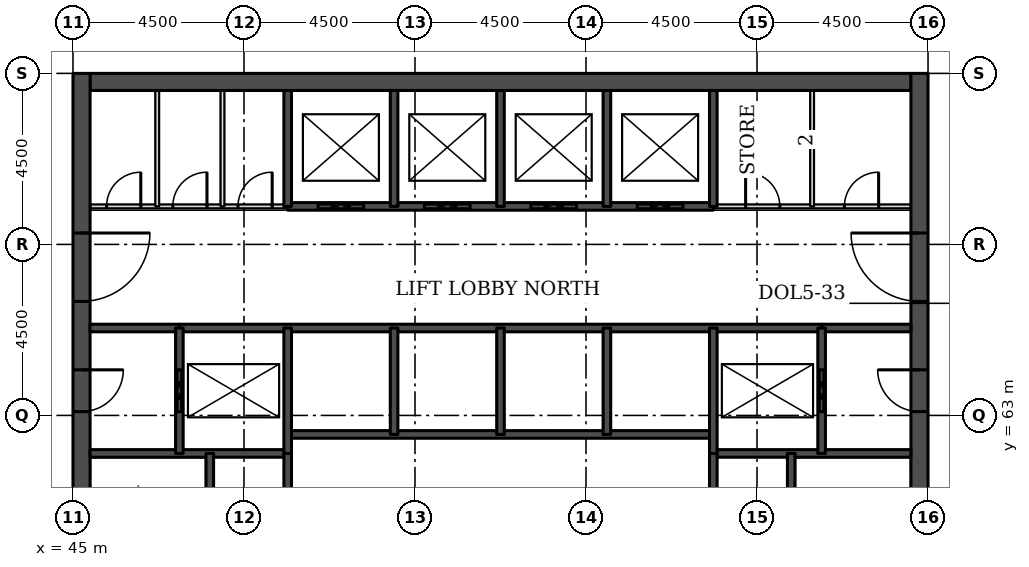
"""IFC4 building model, lengths in metres.
Left out: names, types, materials, properties, quantities, classifications, styles, units other than length and angle.
Written with IfcOpenShell. Run it as: python <this file> out.ifc"""

import sys

from ifc_helpers import new_model, si_unit, direction, frame, frame_2d, origin, place, context, subcontext, project, spatial, rectangle, extrude, element, fill, save


model = new_model("IFC4")
c1 = context("Model", 3, precision=1e-05, world=origin(), true_north=direction((0.0, 1.0)))
c2 = subcontext(c1, "Body", "Model", "MODEL_VIEW")
j1 = project(units=[si_unit("LENGTHUNIT", "METRE"), si_unit("PLANEANGLEUNIT", "RADIAN")], contexts=[c1])
p1 = place(None, origin())
s1 = spatial("IfcSite", under=j1, at=p1, CompositionType="ELEMENT")
p2 = place(p1, origin())
s2 = spatial("IfcBuilding", under=s1, at=p2, CompositionType="ELEMENT")
p3 = place(p2, frame((0.0, 0.0, 108.5)))
s3 = spatial("IfcBuildingStorey", under=s2, at=p3, CompositionType="ELEMENT", Elevation=108.5)
p4 = place(p3, frame((45.45, 71.775, 0.0), z_axis=(0.0, 0.0, 1.0), x_axis=(1.0, 0.0, 0.0)))
e1 = element("IfcWall", 1, at=p4, inside=s3, PredefinedType="SHEAR", context=c2, shape_type="SweptSolid", body=[
    extrude(rectangle(XDim=21.6, YDim=0.45, at=frame_2d((10.8, 0.0))), origin(), (0.0, 0.0, 1.0), 3.7),
])
p5 = place(p3, frame((45.225, 49.5, 0.0), z_axis=(0.0, 0.0, 1.0), x_axis=(0.0, 1.0, 0.0)))
e2 = element("IfcWall", 2, at=p5, inside=s3, PredefinedType="SHEAR", context=c2, shape_type="SweptSolid", body=[
    extrude(rectangle(XDim=22.5, YDim=0.45, at=frame_2d((11.25, 0.0))), origin(), (0.0, 0.0, 1.0), 3.7),
])
p6 = place(p5, frame((4.2, 0.0, 0.0)))
e3 = element("IfcOpeningElement", 3, at=p6, cuts=e2, PredefinedType="OPENING", context=c2, shape_type="SweptSolid", body=[
    extrude(rectangle(XDim=1.8, YDim=2.1, at=frame_2d((0.9, 1.05))), frame((0.0, 0.235, 0.0), z_axis=(0.0, -1.0, 0.0), x_axis=(1.0, 0.0, 0.0)), (0.0, 0.0, 1.0), 0.47),
])
p7 = place(p5, frame((6.9, 0.0, 0.0)))
e4 = element("IfcOpeningElement", 4, at=p7, cuts=e2, PredefinedType="OPENING", context=c2, shape_type="SweptSolid", body=[
    extrude(rectangle(XDim=1.1, YDim=2.1, at=frame_2d((0.55, 1.05))), frame((0.0, 0.235, 0.0), z_axis=(0.0, -1.0, 0.0), x_axis=(1.0, 0.0, 0.0)), (0.0, 0.0, 1.0), 0.47),
])
p8 = place(p5, frame((13.6, 0.0, 0.0)))
e5 = element("IfcOpeningElement", 5, at=p8, cuts=e2, PredefinedType="OPENING", context=c2, shape_type="SweptSolid", body=[
    extrude(rectangle(XDim=1.1, YDim=2.1, at=frame_2d((0.55, 1.05))), frame((0.0, 0.235, 0.0), z_axis=(0.0, -1.0, 0.0), x_axis=(1.0, 0.0, 0.0)), (0.0, 0.0, 1.0), 0.47),
])
p9 = place(p5, frame((16.5, 0.0, 0.0)))
e6 = element("IfcOpeningElement", 6, at=p9, cuts=e2, PredefinedType="OPENING", context=c2, shape_type="SweptSolid", body=[
    extrude(rectangle(XDim=1.8, YDim=2.1, at=frame_2d((0.9, 1.05))), frame((0.0, 0.235, 0.0), z_axis=(0.0, -1.0, 0.0), x_axis=(1.0, 0.0, 0.0)), (0.0, 0.0, 1.0), 0.47),
])
p10 = place(p3, frame((67.275, 49.5, 0.0), z_axis=(0.0, 0.0, 1.0), x_axis=(0.0, 1.0, 0.0)))
e7 = element("IfcWall", 7, at=p10, inside=s3, PredefinedType="SHEAR", context=c2, shape_type="SweptSolid", body=[
    extrude(rectangle(XDim=22.5, YDim=0.45, at=frame_2d((11.25, 0.0))), origin(), (0.0, 0.0, 1.0), 3.7),
])
p11 = place(p10, frame((4.2, 0.0, 0.0)))
e8 = element("IfcOpeningElement", 8, at=p11, cuts=e7, PredefinedType="OPENING", context=c2, shape_type="SweptSolid", body=[
    extrude(rectangle(XDim=1.8, YDim=2.1, at=frame_2d((0.9, 1.05))), frame((0.0, 0.235, 0.0), z_axis=(0.0, -1.0, 0.0), x_axis=(1.0, 0.0, 0.0)), (0.0, 0.0, 1.0), 0.47),
])
p12 = place(p10, frame((6.9, 0.0, 0.0)))
e9 = element("IfcOpeningElement", 9, at=p12, cuts=e7, PredefinedType="OPENING", context=c2, shape_type="SweptSolid", body=[
    extrude(rectangle(XDim=1.1, YDim=2.1, at=frame_2d((0.55, 1.05))), frame((0.0, 0.235, 0.0), z_axis=(0.0, -1.0, 0.0), x_axis=(1.0, 0.0, 0.0)), (0.0, 0.0, 1.0), 0.47),
])
p13 = place(p10, frame((13.6, 0.0, 0.0)))
e10 = element("IfcOpeningElement", 10, at=p13, cuts=e7, PredefinedType="OPENING", context=c2, shape_type="SweptSolid", body=[
    extrude(rectangle(XDim=1.1, YDim=2.1, at=frame_2d((0.55, 1.05))), frame((0.0, 0.235, 0.0), z_axis=(0.0, -1.0, 0.0), x_axis=(1.0, 0.0, 0.0)), (0.0, 0.0, 1.0), 0.47),
])
p14 = place(p10, frame((16.5, 0.0, 0.0)))
e11 = element("IfcOpeningElement", 11, at=p14, cuts=e7, PredefinedType="OPENING", context=c2, shape_type="SweptSolid", body=[
    extrude(rectangle(XDim=1.8, YDim=2.1, at=frame_2d((0.9, 1.05))), frame((0.0, 0.235, 0.0), z_axis=(0.0, -1.0, 0.0), x_axis=(1.0, 0.0, 0.0)), (0.0, 0.0, 1.0), 0.47),
])
for number, where, z_axis, x_axis in (
    (12, (45.45, 62.0, 0.0), (0.0, 0.0, 1.0), (1.0, 0.0, 0.0)),
    (13, (61.85, 62.0, 0.0), (0.0, 0.0, 1.0), (1.0, 0.0, 0.0)),
):
    element("IfcWall", number, at=place(p3, frame(where, z_axis=z_axis, x_axis=x_axis)), inside=s3, PredefinedType="SOLIDWALL", context=c2, shape_type="SweptSolid", body=[
        extrude(rectangle(XDim=5.2, YDim=0.2, at=frame_2d((2.6, 0.0))), origin(), (0.0, 0.0, 1.0), 3.55),
    ])
p15 = place(p3, frame((50.65, 62.5, 0.0), z_axis=(0.0, 0.0, 1.0), x_axis=(1.0, 0.0, 0.0)))
e14 = element("IfcWall", 14, at=p15, inside=s3, PredefinedType="SOLIDWALL", context=c2, shape_type="SweptSolid", body=[
    extrude(rectangle(XDim=11.2, YDim=0.2, at=frame_2d((5.6, 0.0))), origin(), (0.0, 0.0, 1.0), 3.7),
])
for number, where, z_axis, x_axis in (
    (15, (45.45, 65.3, 0.0), (0.0, 0.0, 1.0), (1.0, 0.0, 0.0)),
    (16, (64.7, 65.3, 0.0), (0.0, 0.0, 1.0), (1.0, 0.0, 0.0)),
):
    element("IfcWall", number, at=place(p3, frame(where, z_axis=z_axis, x_axis=x_axis)), inside=s3, PredefinedType="SOLIDWALL", context=c2, shape_type="SweptSolid", body=[
        extrude(rectangle(XDim=2.35, YDim=0.2, at=frame_2d((1.175, 0.0))), origin(), (0.0, 0.0, 1.0), 3.55),
    ])
p16 = place(p3, frame((47.8, 65.3, 0.0), z_axis=(0.0, 0.0, 1.0), x_axis=(1.0, 0.0, 0.0)))
e17 = element("IfcWall", 17, at=p16, inside=s3, PredefinedType="SOLIDWALL", context=c2, shape_type="SweptSolid", body=[
    extrude(rectangle(XDim=16.9, YDim=0.2, at=frame_2d((8.45, 0.0))), origin(), (0.0, 0.0, 1.0), 3.55),
])
p17 = place(p3, frame((45.45, 68.5, 0.0), z_axis=(0.0, 0.0, 1.0), x_axis=(1.0, 0.0, 0.0)))
e18 = element("IfcWall", 18, at=p17, inside=s3, PredefinedType="PARTITIONING", context=c2, shape_type="SweptSolid", body=[
    extrude(rectangle(XDim=5.2, YDim=0.1, at=frame_2d((2.6, 0.0))), origin(), (0.0, 0.0, 1.0), 3.55),
])
p18 = place(p17, frame((0.434, 0.0, 0.0)))
e19 = element("IfcOpeningElement", 19, at=p18, cuts=e18, PredefinedType="OPENING", context=c2, shape_type="SweptSolid", body=[
    extrude(rectangle(XDim=0.9, YDim=2.1, at=frame_2d((0.45, 1.05))), frame((0.0, 0.06, 0.0), z_axis=(0.0, -1.0, 0.0), x_axis=(1.0, 0.0, 0.0)), (0.0, 0.0, 1.0), 0.12),
])
p19 = place(p17, frame((2.176, 0.0, 0.0)))
e20 = element("IfcOpeningElement", 20, at=p19, cuts=e18, PredefinedType="OPENING", context=c2, shape_type="SweptSolid", body=[
    extrude(rectangle(XDim=0.9, YDim=2.1, at=frame_2d((0.45, 1.05))), frame((0.0, 0.06, 0.0), z_axis=(0.0, -1.0, 0.0), x_axis=(1.0, 0.0, 0.0)), (0.0, 0.0, 1.0), 0.12),
])
p20 = place(p17, frame((3.892, 0.0, 0.0)))
e21 = element("IfcOpeningElement", 21, at=p20, cuts=e18, PredefinedType="OPENING", context=c2, shape_type="SweptSolid", body=[
    extrude(rectangle(XDim=0.9, YDim=2.1, at=frame_2d((0.45, 1.05))), frame((0.0, 0.06, 0.0), z_axis=(0.0, -1.0, 0.0), x_axis=(1.0, 0.0, 0.0)), (0.0, 0.0, 1.0), 0.12),
])
p21 = place(p3, frame((61.85, 68.5, 0.0), z_axis=(0.0, 0.0, 1.0), x_axis=(1.0, 0.0, 0.0)))
e22 = element("IfcWall", 22, at=p21, inside=s3, PredefinedType="PARTITIONING", context=c2, shape_type="SweptSolid", body=[
    extrude(rectangle(XDim=5.2, YDim=0.1, at=frame_2d((2.6, 0.0))), origin(), (0.0, 0.0, 1.0), 3.55),
])
p22 = place(p21, frame((3.45, 0.0, 0.0)))
e23 = element("IfcOpeningElement", 23, at=p22, cuts=e22, PredefinedType="OPENING", context=c2, shape_type="SweptSolid", body=[
    extrude(rectangle(XDim=0.9, YDim=2.1, at=frame_2d((0.45, 1.05))), frame((0.0, 0.06, 0.0), z_axis=(0.0, -1.0, 0.0), x_axis=(1.0, 0.0, 0.0)), (0.0, 0.0, 1.0), 0.12),
])
p23 = place(p21, frame((0.85, 0.0, 0.0)))
e24 = element("IfcOpeningElement", 24, at=p23, cuts=e22, PredefinedType="OPENING", context=c2, shape_type="SweptSolid", body=[
    extrude(rectangle(XDim=0.9, YDim=2.1, at=frame_2d((0.45, 1.05))), frame((0.0, 0.06, 0.0), z_axis=(0.0, -1.0, 0.0), x_axis=(1.0, 0.0, 0.0)), (0.0, 0.0, 1.0), 0.12),
])
p24 = place(p3, frame((50.65, 68.5, 0.0), z_axis=(0.0, 0.0, 1.0), x_axis=(1.0, 0.0, 0.0)))
e25 = element("IfcWall", 25, at=p24, inside=s3, PredefinedType="SOLIDWALL", context=c2, shape_type="SweptSolid", body=[
    extrude(rectangle(XDim=11.2, YDim=0.2, at=frame_2d((5.6, 0.0))), origin(), (0.0, 0.0, 1.0), 3.55),
])
p25 = place(p24, frame((0.8, 0.0, 0.0)))
e26 = element("IfcOpeningElement", 26, at=p25, cuts=e25, PredefinedType="OPENING", context=c2, shape_type="SweptSolid", body=[
    extrude(rectangle(XDim=1.2, YDim=2.1, at=frame_2d((0.6, 1.05))), frame((0.0, 0.11, 0.0), z_axis=(0.0, -1.0, 0.0), x_axis=(1.0, 0.0, 0.0)), (0.0, 0.0, 1.0), 0.22),
])
p26 = place(p24, frame((3.6, 0.0, 0.0)))
e27 = element("IfcOpeningElement", 27, at=p26, cuts=e25, PredefinedType="OPENING", context=c2, shape_type="SweptSolid", body=[
    extrude(rectangle(XDim=1.2, YDim=2.1, at=frame_2d((0.6, 1.05))), frame((0.0, 0.11, 0.0), z_axis=(0.0, -1.0, 0.0), x_axis=(1.0, 0.0, 0.0)), (0.0, 0.0, 1.0), 0.22),
])
p27 = place(p24, frame((6.4, 0.0, 0.0)))
e28 = element("IfcOpeningElement", 28, at=p27, cuts=e25, PredefinedType="OPENING", context=c2, shape_type="SweptSolid", body=[
    extrude(rectangle(XDim=1.2, YDim=2.1, at=frame_2d((0.6, 1.05))), frame((0.0, 0.11, 0.0), z_axis=(0.0, -1.0, 0.0), x_axis=(1.0, 0.0, 0.0)), (0.0, 0.0, 1.0), 0.22),
])
p28 = place(p24, frame((9.2, 0.0, 0.0)))
e29 = element("IfcOpeningElement", 29, at=p28, cuts=e25, PredefinedType="OPENING", context=c2, shape_type="SweptSolid", body=[
    extrude(rectangle(XDim=1.2, YDim=2.1, at=frame_2d((0.6, 1.05))), frame((0.0, 0.11, 0.0), z_axis=(0.0, -1.0, 0.0), x_axis=(1.0, 0.0, 0.0)), (0.0, 0.0, 1.0), 0.22),
])
p29 = place(p3, frame((47.218, 68.5, 0.0), z_axis=(0.0, 0.0, 1.0), x_axis=(0.0, 1.0, 0.0)))
e30 = element("IfcWall", 30, at=p29, inside=s3, PredefinedType="PARTITIONING", context=c2, shape_type="SweptSolid", body=[
    extrude(rectangle(XDim=3.05, YDim=0.1, at=frame_2d((1.525, 0.0))), origin(), (0.0, 0.0, 1.0), 3.55),
])
p30 = place(p3, frame((47.8, 62.0, 0.0), z_axis=(0.0, 0.0, 1.0), x_axis=(0.0, 1.0, 0.0)))
e31 = element("IfcWall", 31, at=p30, inside=s3, PredefinedType="SOLIDWALL", context=c2, shape_type="SweptSolid", body=[
    extrude(rectangle(XDim=3.3, YDim=0.2, at=frame_2d((1.65, 0.0))), origin(), (0.0, 0.0, 1.0), 3.55),
])
p31 = place(p30, frame((1.1, 0.0, 0.0)))
e32 = element("IfcOpeningElement", 32, at=p31, cuts=e31, PredefinedType="OPENING", context=c2, shape_type="SweptSolid", body=[
    extrude(rectangle(XDim=1.1, YDim=2.1, at=frame_2d((0.55, 1.05))), frame((0.0, 0.11, 0.0), z_axis=(0.0, -1.0, 0.0), x_axis=(1.0, 0.0, 0.0)), (0.0, 0.0, 1.0), 0.22),
])
p32 = place(p3, frame((48.6, 56.2, 0.0), z_axis=(0.0, 0.0, 1.0), x_axis=(0.0, 1.0, 0.0)))
e33 = element("IfcWall", 33, at=p32, inside=s3, PredefinedType="SOLIDWALL", context=c2, shape_type="SweptSolid", body=[
    extrude(rectangle(XDim=5.8, YDim=0.2, at=frame_2d((2.9, 0.0))), origin(), (0.0, 0.0, 1.0), 3.55),
])
p33 = place(p3, frame((48.934, 68.5, 0.0), z_axis=(0.0, 0.0, 1.0), x_axis=(0.0, 1.0, 0.0)))
e34 = element("IfcWall", 34, at=p33, inside=s3, PredefinedType="PARTITIONING", context=c2, shape_type="SweptSolid", body=[
    extrude(rectangle(XDim=3.05, YDim=0.1, at=frame_2d((1.525, 0.0))), origin(), (0.0, 0.0, 1.0), 3.55),
])
p34 = place(p3, frame((50.65, 59.0, 0.0), z_axis=(0.0, 0.0, 1.0), x_axis=(0.0, 1.0, 0.0)))
e35 = element("IfcWall", 35, at=p34, inside=s3, PredefinedType="SOLIDWALL", context=c2, shape_type="SweptSolid", body=[
    extrude(rectangle(XDim=3.0, YDim=0.2, at=frame_2d((1.5, 0.0))), origin(), (0.0, 0.0, 1.0), 3.7),
])
p35 = place(p3, frame((50.65, 62.0, 0.0), z_axis=(0.0, 0.0, 1.0), x_axis=(0.0, 1.0, 0.0)))
e36 = element("IfcWall", 36, at=p35, inside=s3, PredefinedType="SOLIDWALL", context=c2, shape_type="SweptSolid", body=[
    extrude(rectangle(XDim=3.3, YDim=0.2, at=frame_2d((1.65, 0.0))), origin(), (0.0, 0.0, 1.0), 3.55),
])
p36 = place(p3, frame((50.65, 68.5, 0.0), z_axis=(0.0, 0.0, 1.0), x_axis=(0.0, 1.0, 0.0)))
e37 = element("IfcWall", 37, at=p36, inside=s3, PredefinedType="SOLIDWALL", context=c2, shape_type="SweptSolid", body=[
    extrude(rectangle(XDim=3.05, YDim=0.2, at=frame_2d((1.525, 0.0))), origin(), (0.0, 0.0, 1.0), 3.55),
])
p37 = place(p3, frame((53.45, 62.5, 0.0), z_axis=(0.0, 0.0, 1.0), x_axis=(0.0, 1.0, 0.0)))
e38 = element("IfcWall", 38, at=p37, inside=s3, PredefinedType="SOLIDWALL", context=c2, shape_type="SweptSolid", body=[
    extrude(rectangle(XDim=2.8, YDim=0.2, at=frame_2d((1.4, 0.0))), origin(), (0.0, 0.0, 1.0), 3.55),
])
p38 = place(p3, frame((53.45, 68.5, 0.0), z_axis=(0.0, 0.0, 1.0), x_axis=(0.0, 1.0, 0.0)))
e39 = element("IfcWall", 39, at=p38, inside=s3, PredefinedType="SOLIDWALL", context=c2, shape_type="SweptSolid", body=[
    extrude(rectangle(XDim=3.05, YDim=0.2, at=frame_2d((1.525, 0.0))), origin(), (0.0, 0.0, 1.0), 3.55),
])
p39 = place(p3, frame((56.25, 62.5, 0.0), z_axis=(0.0, 0.0, 1.0), x_axis=(0.0, 1.0, 0.0)))
e40 = element("IfcWall", 40, at=p39, inside=s3, PredefinedType="SOLIDWALL", context=c2, shape_type="SweptSolid", body=[
    extrude(rectangle(XDim=2.8, YDim=0.2, at=frame_2d((1.4, 0.0))), origin(), (0.0, 0.0, 1.0), 3.55),
])
p40 = place(p3, frame((56.25, 68.5, 0.0), z_axis=(0.0, 0.0, 1.0), x_axis=(0.0, 1.0, 0.0)))
e41 = element("IfcWall", 41, at=p40, inside=s3, PredefinedType="SOLIDWALL", context=c2, shape_type="SweptSolid", body=[
    extrude(rectangle(XDim=3.05, YDim=0.2, at=frame_2d((1.525, 0.0))), origin(), (0.0, 0.0, 1.0), 3.55),
])
p41 = place(p3, frame((59.05, 62.5, 0.0), z_axis=(0.0, 0.0, 1.0), x_axis=(0.0, 1.0, 0.0)))
e42 = element("IfcWall", 42, at=p41, inside=s3, PredefinedType="SOLIDWALL", context=c2, shape_type="SweptSolid", body=[
    extrude(rectangle(XDim=2.8, YDim=0.2, at=frame_2d((1.4, 0.0))), origin(), (0.0, 0.0, 1.0), 3.55),
])
p42 = place(p3, frame((59.05, 68.5, 0.0), z_axis=(0.0, 0.0, 1.0), x_axis=(0.0, 1.0, 0.0)))
e43 = element("IfcWall", 43, at=p42, inside=s3, PredefinedType="SOLIDWALL", context=c2, shape_type="SweptSolid", body=[
    extrude(rectangle(XDim=3.05, YDim=0.2, at=frame_2d((1.525, 0.0))), origin(), (0.0, 0.0, 1.0), 3.55),
])
p43 = place(p3, frame((61.85, 59.0, 0.0), z_axis=(0.0, 0.0, 1.0), x_axis=(0.0, 1.0, 0.0)))
e44 = element("IfcWall", 44, at=p43, inside=s3, PredefinedType="SOLIDWALL", context=c2, shape_type="SweptSolid", body=[
    extrude(rectangle(XDim=3.0, YDim=0.2, at=frame_2d((1.5, 0.0))), origin(), (0.0, 0.0, 1.0), 3.7),
])
p44 = place(p3, frame((61.85, 62.0, 0.0), z_axis=(0.0, 0.0, 1.0), x_axis=(0.0, 1.0, 0.0)))
e45 = element("IfcWall", 45, at=p44, inside=s3, PredefinedType="SOLIDWALL", context=c2, shape_type="SweptSolid", body=[
    extrude(rectangle(XDim=3.3, YDim=0.2, at=frame_2d((1.65, 0.0))), origin(), (0.0, 0.0, 1.0), 3.55),
])
p45 = place(p3, frame((61.85, 68.5, 0.0), z_axis=(0.0, 0.0, 1.0), x_axis=(0.0, 1.0, 0.0)))
e46 = element("IfcWall", 46, at=p45, inside=s3, PredefinedType="SOLIDWALL", context=c2, shape_type="SweptSolid", body=[
    extrude(rectangle(XDim=3.05, YDim=0.2, at=frame_2d((1.525, 0.0))), origin(), (0.0, 0.0, 1.0), 3.55),
])
p46 = place(p3, frame((63.9, 56.2, 0.0), z_axis=(0.0, 0.0, 1.0), x_axis=(0.0, 1.0, 0.0)))
e47 = element("IfcWall", 47, at=p46, inside=s3, PredefinedType="SOLIDWALL", context=c2, shape_type="SweptSolid", body=[
    extrude(rectangle(XDim=5.8, YDim=0.2, at=frame_2d((2.9, 0.0))), origin(), (0.0, 0.0, 1.0), 3.55),
])
p47 = place(p3, frame((64.45, 68.5, 0.0), z_axis=(0.0, 0.0, 1.0), x_axis=(0.0, 1.0, 0.0)))
e48 = element("IfcWall", 48, at=p47, inside=s3, PredefinedType="PARTITIONING", context=c2, shape_type="SweptSolid", body=[
    extrude(rectangle(XDim=3.05, YDim=0.1, at=frame_2d((1.525, 0.0))), origin(), (0.0, 0.0, 1.0), 3.55),
])
p48 = place(p3, frame((64.7, 62.0, 0.0), z_axis=(0.0, 0.0, 1.0), x_axis=(0.0, 1.0, 0.0)))
e49 = element("IfcWall", 49, at=p48, inside=s3, PredefinedType="SOLIDWALL", context=c2, shape_type="SweptSolid", body=[
    extrude(rectangle(XDim=3.3, YDim=0.2, at=frame_2d((1.65, 0.0))), origin(), (0.0, 0.0, 1.0), 3.55),
])
p49 = place(p48, frame((1.1, 0.0, 0.0)))
e50 = element("IfcOpeningElement", 50, at=p49, cuts=e49, PredefinedType="OPENING", context=c2, shape_type="SweptSolid", body=[
    extrude(rectangle(XDim=1.1, YDim=2.1, at=frame_2d((0.55, 1.05))), frame((0.0, 0.11, 0.0), z_axis=(0.0, -1.0, 0.0), x_axis=(1.0, 0.0, 0.0)), (0.0, 0.0, 1.0), 0.22),
])
p50 = place(p25, origin())
e51 = element("IfcDoor", 51, at=p50, inside=s3, OperationType="DOUBLE_DOOR_SLIDING", PredefinedType="DOOR", context=c2, shape_type="SweptSolid", body=[
    extrude(rectangle(XDim=1.2, YDim=2.1, at=frame_2d((0.6, 1.05))), frame((0.0, 0.025, 0.0), z_axis=(0.0, -1.0, 0.0), x_axis=(1.0, 0.0, 0.0)), (0.0, 0.0, 1.0), 0.05),
])
fill(e26, e51)
p51 = place(p26, origin())
e52 = element("IfcDoor", 52, at=p51, inside=s3, OperationType="DOUBLE_DOOR_SLIDING", PredefinedType="DOOR", context=c2, shape_type="SweptSolid", body=[
    extrude(rectangle(XDim=1.2, YDim=2.1, at=frame_2d((0.6, 1.05))), frame((0.0, 0.025, 0.0), z_axis=(0.0, -1.0, 0.0), x_axis=(1.0, 0.0, 0.0)), (0.0, 0.0, 1.0), 0.05),
])
fill(e27, e52)
p52 = place(p27, origin())
e53 = element("IfcDoor", 53, at=p52, inside=s3, OperationType="DOUBLE_DOOR_SLIDING", PredefinedType="DOOR", context=c2, shape_type="SweptSolid", body=[
    extrude(rectangle(XDim=1.2, YDim=2.1, at=frame_2d((0.6, 1.05))), frame((0.0, 0.025, 0.0), z_axis=(0.0, -1.0, 0.0), x_axis=(1.0, 0.0, 0.0)), (0.0, 0.0, 1.0), 0.05),
])
fill(e28, e53)
p53 = place(p28, origin())
e54 = element("IfcDoor", 54, at=p53, inside=s3, OperationType="DOUBLE_DOOR_SLIDING", PredefinedType="DOOR", context=c2, shape_type="SweptSolid", body=[
    extrude(rectangle(XDim=1.2, YDim=2.1, at=frame_2d((0.6, 1.05))), frame((0.0, 0.025, 0.0), z_axis=(0.0, -1.0, 0.0), x_axis=(1.0, 0.0, 0.0)), (0.0, 0.0, 1.0), 0.05),
])
fill(e29, e54)
p54 = place(p31, origin())
e55 = element("IfcDoor", 55, at=p54, inside=s3, OperationType="DOUBLE_DOOR_SLIDING", PredefinedType="DOOR", context=c2, shape_type="SweptSolid", body=[
    extrude(rectangle(XDim=1.1, YDim=2.1, at=frame_2d((0.55, 1.05))), frame((0.0, 0.025, 0.0), z_axis=(0.0, -1.0, 0.0), x_axis=(1.0, 0.0, 0.0)), (0.0, 0.0, 1.0), 0.05),
])
fill(e32, e55)
p55 = place(p49, origin())
e56 = element("IfcDoor", 56, at=p55, inside=s3, OperationType="DOUBLE_DOOR_SLIDING", PredefinedType="DOOR", context=c2, shape_type="SweptSolid", body=[
    extrude(rectangle(XDim=1.1, YDim=2.1, at=frame_2d((0.55, 1.05))), frame((0.0, 0.025, 0.0), z_axis=(0.0, -1.0, 0.0), x_axis=(1.0, 0.0, 0.0)), (0.0, 0.0, 1.0), 0.05),
])
fill(e50, e56)
p56 = place(p8, frame((1.1, 0.0, 0.0), z_axis=(0.0, 0.0, 1.0), x_axis=(-1.0, 0.0, 0.0)))
e57 = element("IfcDoor", 57, at=p56, inside=s3, OperationType="SINGLE_SWING_LEFT", PredefinedType="DOOR", context=c2, shape_type="SweptSolid", body=[
    extrude(rectangle(XDim=1.1, YDim=2.1, at=frame_2d((0.55, 1.05))), frame((0.0, 0.025, 0.0), z_axis=(0.0, -1.0, 0.0), x_axis=(1.0, 0.0, 0.0)), (0.0, 0.0, 1.0), 0.05),
])
fill(e5, e57)
p57 = place(p9, frame((1.8, 0.0, 0.0), z_axis=(0.0, 0.0, 1.0), x_axis=(-1.0, 0.0, 0.0)))
e58 = element("IfcDoor", 58, at=p57, inside=s3, OperationType="SINGLE_SWING_LEFT", PredefinedType="DOOR", context=c2, shape_type="SweptSolid", body=[
    extrude(rectangle(XDim=1.8, YDim=2.1, at=frame_2d((0.9, 1.05))), frame((0.0, 0.025, 0.0), z_axis=(0.0, -1.0, 0.0), x_axis=(1.0, 0.0, 0.0)), (0.0, 0.0, 1.0), 0.05),
])
fill(e6, e58)
p58 = place(p13, origin())
e59 = element("IfcDoor", 59, at=p58, inside=s3, OperationType="SINGLE_SWING_RIGHT", PredefinedType="DOOR", context=c2, shape_type="SweptSolid", body=[
    extrude(rectangle(XDim=1.1, YDim=2.1, at=frame_2d((0.55, 1.05))), frame((0.0, 0.025, 0.0), z_axis=(0.0, -1.0, 0.0), x_axis=(1.0, 0.0, 0.0)), (0.0, 0.0, 1.0), 0.05),
])
fill(e10, e59)
p59 = place(p14, origin())
e60 = element("IfcDoor", 60, at=p59, inside=s3, OperationType="SINGLE_SWING_RIGHT", PredefinedType="DOOR", context=c2, shape_type="SweptSolid", body=[
    extrude(rectangle(XDim=1.8, YDim=2.1, at=frame_2d((0.9, 1.05))), frame((0.0, 0.025, 0.0), z_axis=(0.0, -1.0, 0.0), x_axis=(1.0, 0.0, 0.0)), (0.0, 0.0, 1.0), 0.05),
])
fill(e11, e60)
p60 = place(p22, origin())
e61 = element("IfcDoor", 61, at=p60, inside=s3, OperationType="SINGLE_SWING_RIGHT", PredefinedType="DOOR", context=c2, shape_type="SweptSolid", body=[
    extrude(rectangle(XDim=0.9, YDim=2.1, at=frame_2d((0.45, 1.05))), frame((0.0, 0.025, 0.0), z_axis=(0.0, -1.0, 0.0), x_axis=(1.0, 0.0, 0.0)), (0.0, 0.0, 1.0), 0.05),
])
fill(e23, e61)
p61 = place(p23, origin())
e62 = element("IfcDoor", 62, at=p61, inside=s3, OperationType="SINGLE_SWING_LEFT", PredefinedType="DOOR", context=c2, shape_type="SweptSolid", body=[
    extrude(rectangle(XDim=0.9, YDim=2.1, at=frame_2d((0.45, 1.05))), frame((0.0, 0.025, 0.0), z_axis=(0.0, -1.0, 0.0), x_axis=(1.0, 0.0, 0.0)), (0.0, 0.0, 1.0), 0.05),
])
fill(e24, e62)
p62 = place(p18, origin())
e63 = element("IfcDoor", 63, at=p62, inside=s3, OperationType="SINGLE_SWING_RIGHT", PredefinedType="DOOR", context=c2, shape_type="SweptSolid", body=[
    extrude(rectangle(XDim=0.9, YDim=2.1, at=frame_2d((0.45, 1.05))), frame((0.0, 0.025, 0.0), z_axis=(0.0, -1.0, 0.0), x_axis=(1.0, 0.0, 0.0)), (0.0, 0.0, 1.0), 0.05),
])
fill(e19, e63)
p63 = place(p19, origin())
e64 = element("IfcDoor", 64, at=p63, inside=s3, OperationType="SINGLE_SWING_RIGHT", PredefinedType="DOOR", context=c2, shape_type="SweptSolid", body=[
    extrude(rectangle(XDim=0.9, YDim=2.1, at=frame_2d((0.45, 1.05))), frame((0.0, 0.025, 0.0), z_axis=(0.0, -1.0, 0.0), x_axis=(1.0, 0.0, 0.0)), (0.0, 0.0, 1.0), 0.05),
])
fill(e20, e64)
p64 = place(p20, origin())
e65 = element("IfcDoor", 65, at=p64, inside=s3, OperationType="SINGLE_SWING_RIGHT", PredefinedType="DOOR", context=c2, shape_type="SweptSolid", body=[
    extrude(rectangle(XDim=0.9, YDim=2.1, at=frame_2d((0.45, 1.05))), frame((0.0, 0.025, 0.0), z_axis=(0.0, -1.0, 0.0), x_axis=(1.0, 0.0, 0.0)), (0.0, 0.0, 1.0), 0.05),
])
fill(e21, e65)
save(model, sys.argv[1])
